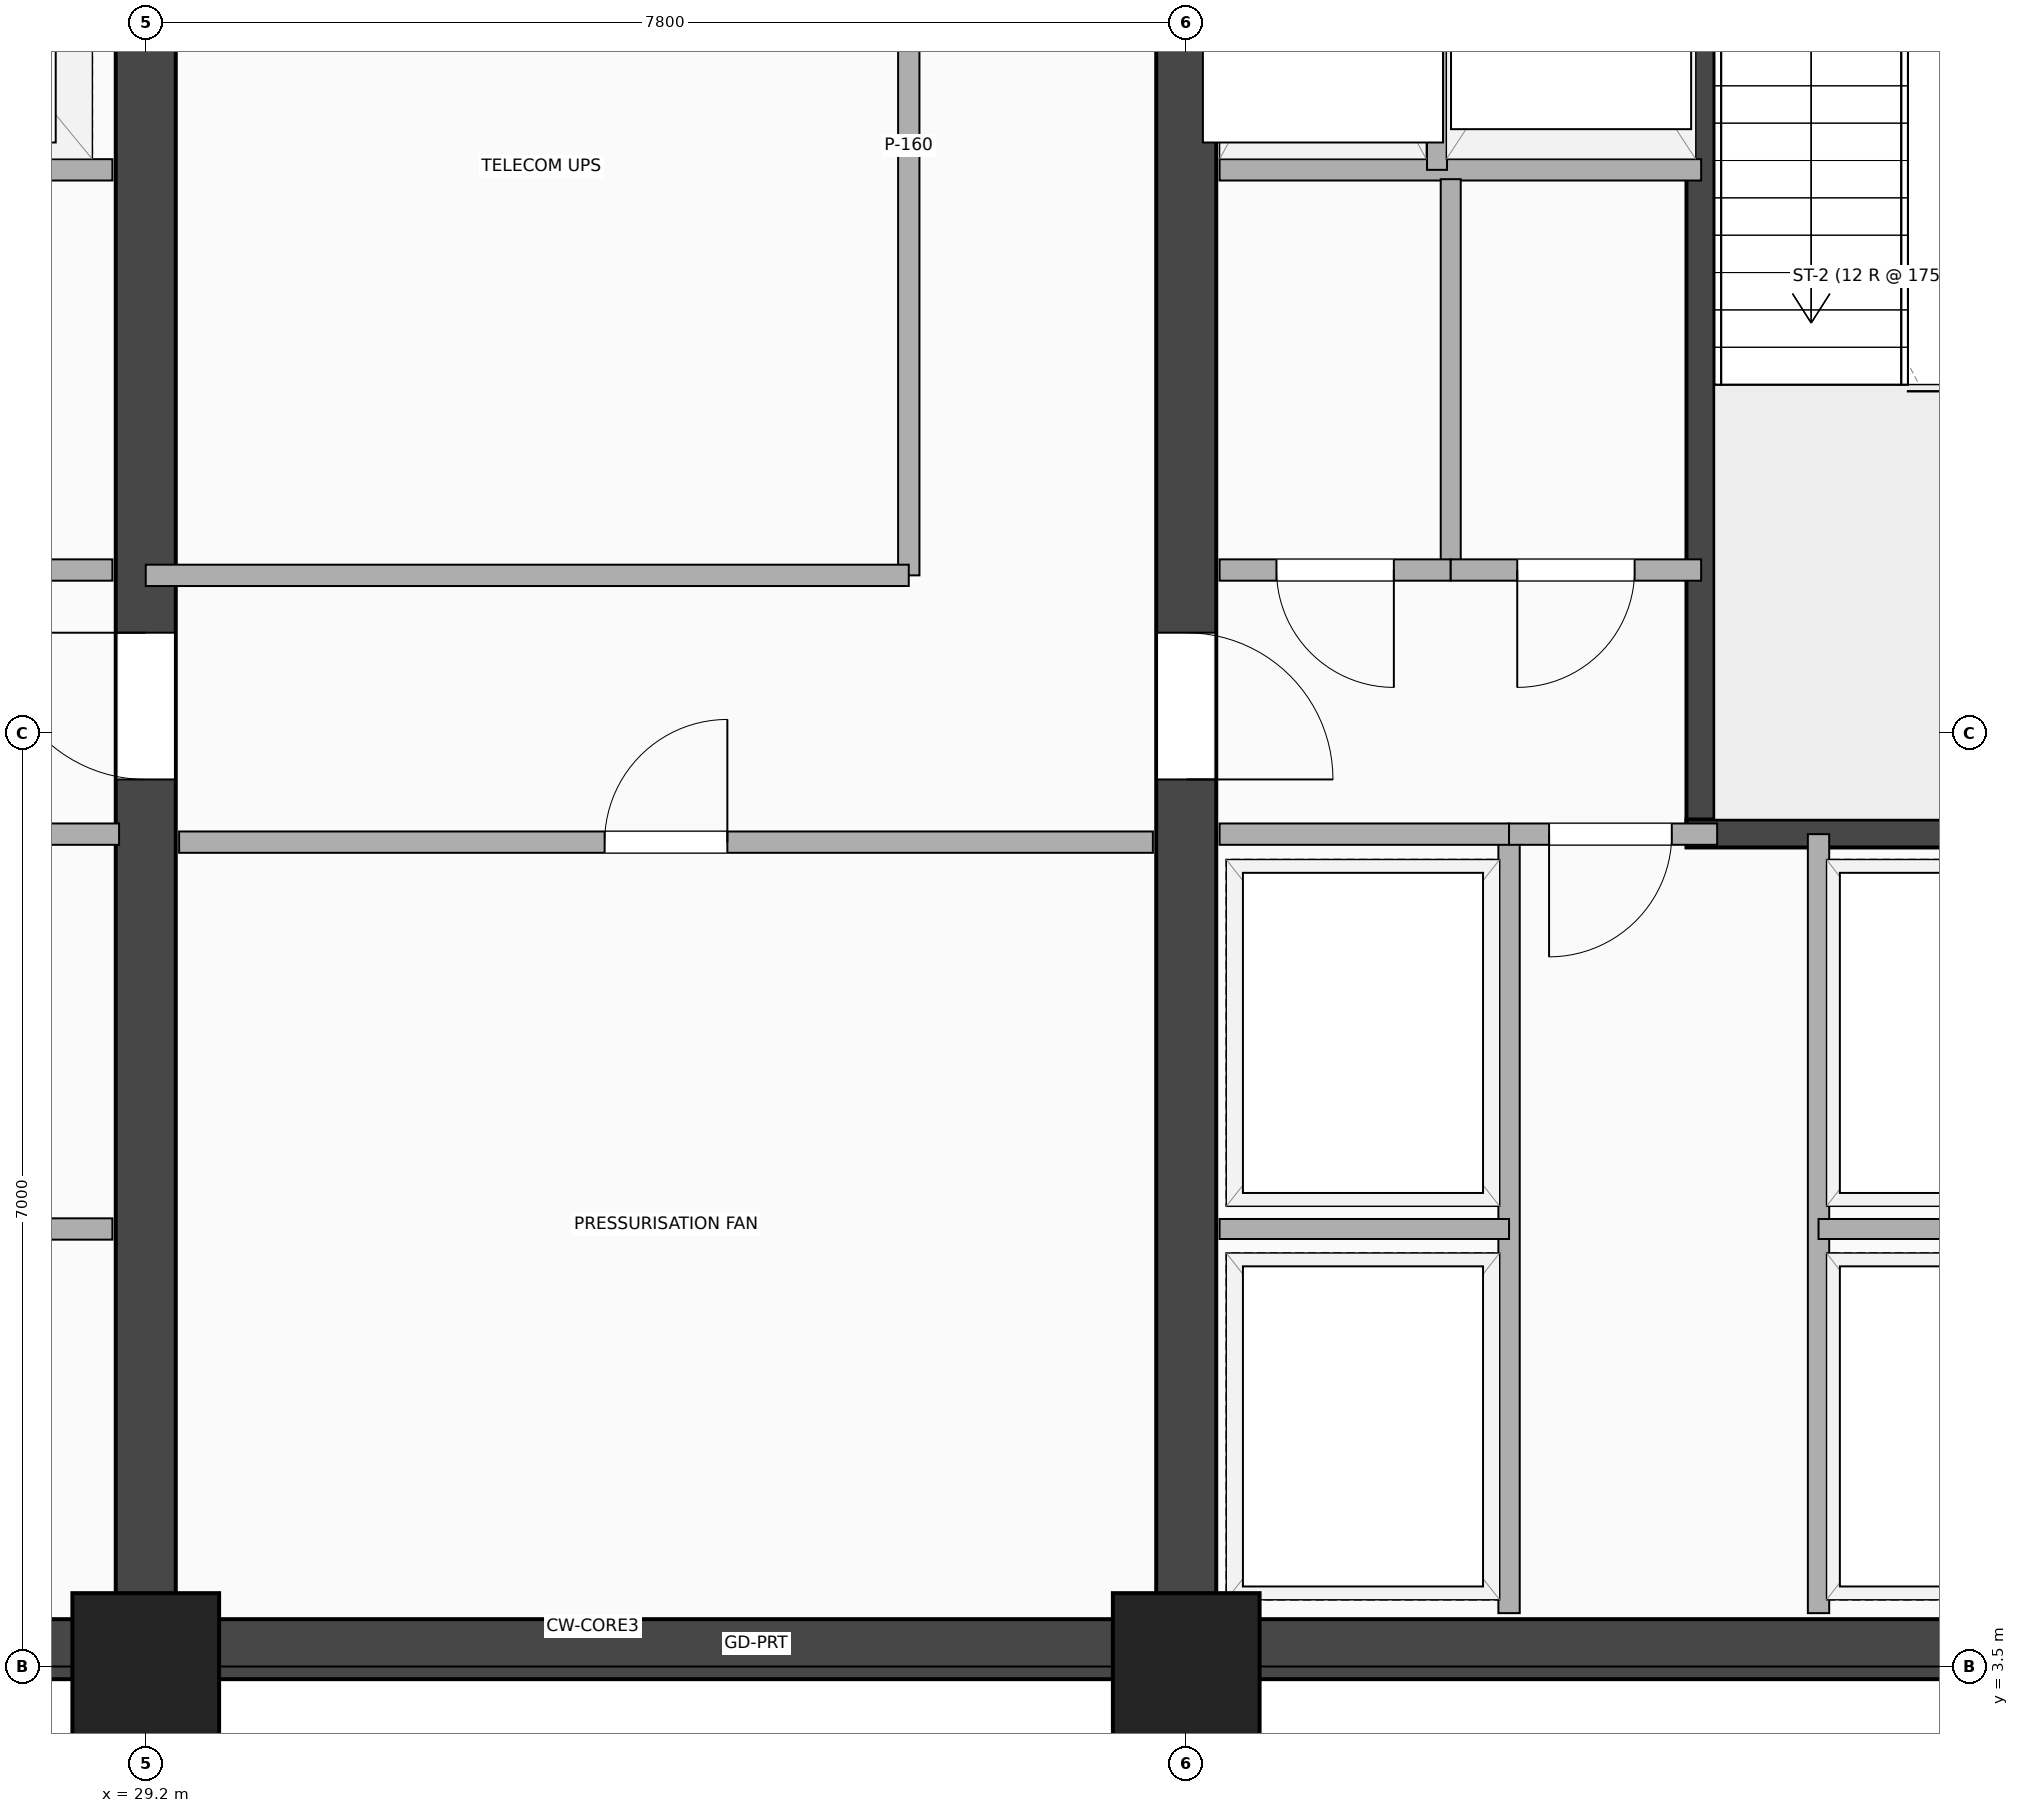
"""IFC4 building model, lengths in metres.
Left out: names, types, materials, properties, quantities, classifications, styles, units other than length and angle.
Written with IfcOpenShell. Run it as: python <this file> out.ifc"""

import sys

from ifc_helpers import new_model, si_unit, direction, frame, frame_2d, origin, origin_2d, place, context, subcontext, project, spatial, rectangle, extrude, element, fill, save


model = new_model("IFC4")
c1 = context("Model", 3, precision=1e-05, world=origin(), true_north=direction((0.0, 1.0)))
c2 = subcontext(c1, "Body", "Model", "MODEL_VIEW")
j1 = project(units=[si_unit("LENGTHUNIT", "METRE"), si_unit("PLANEANGLEUNIT", "RADIAN")], contexts=[c1])
p1 = place(None, origin())
s1 = spatial("IfcSite", under=j1, at=p1, CompositionType="ELEMENT")
p2 = place(p1, origin())
s2 = spatial("IfcBuilding", under=s1, at=p2, CompositionType="ELEMENT")
p3 = place(p2, frame((0.0, 0.0, 184.1)))
s3 = spatial("IfcBuildingStorey", under=s2, at=p3, CompositionType="ELEMENT", Elevation=184.1)
p4 = place(p3, frame((20.3, 3.63, 0.0), z_axis=(0.0, 0.0, 1.0), x_axis=(1.0, 0.0, 0.0)))
e1 = element("IfcWall", 1, at=p4, inside=s3, PredefinedType="SHEAR", context=c2, shape_type="SweptSolid", body=[
    extrude(rectangle(XDim=24.5, YDim=0.45, at=frame_2d((12.25, 0.0))), origin(), (0.0, 0.0, 1.0), 8.16),
])
p5 = place(p3, frame((29.2, 3.5, 0.0), z_axis=(0.0, 0.0, 1.0), x_axis=(0.0, 1.0, 0.0)))
e2 = element("IfcWall", 2, at=p5, inside=s3, PredefinedType="SHEAR", context=c2, shape_type="SweptSolid", body=[
    extrude(rectangle(XDim=14.95, YDim=0.45, at=frame_2d((7.475, 0.0))), origin(), (0.0, 0.0, 1.0), 8.16),
])
p6 = place(p5, frame((7.75, 0.0, 0.0), z_axis=(0.0, 0.0, 1.0), x_axis=(-1.0, 0.0, 0.0)))
e3 = element("IfcOpeningElement", 3, at=p6, cuts=e2, PredefinedType="OPENING", context=c2, shape_type="SweptSolid", body=[
    extrude(rectangle(XDim=1.1, YDim=2.15, at=frame_2d((0.55, 1.075))), frame((0.0, 0.235, 0.0), z_axis=(0.0, -1.0, 0.0), x_axis=(1.0, 0.0, 0.0)), (0.0, 0.0, 1.0), 0.47),
])
p7 = place(p3, frame((37.0, 3.5, 0.0), z_axis=(0.0, 0.0, 1.0), x_axis=(0.0, 1.0, 0.0)))
e4 = element("IfcWall", 4, at=p7, inside=s3, PredefinedType="SHEAR", context=c2, shape_type="SweptSolid", body=[
    extrude(rectangle(XDim=14.95, YDim=0.45, at=frame_2d((7.475, 0.0))), origin(), (0.0, 0.0, 1.0), 8.16),
])
p8 = place(p7, frame((6.65, 0.0, 0.0)))
e5 = element("IfcOpeningElement", 5, at=p8, cuts=e4, PredefinedType="OPENING", context=c2, shape_type="SweptSolid", body=[
    extrude(rectangle(XDim=1.1, YDim=2.15, at=frame_2d((0.55, 1.075))), frame((0.0, 0.235, 0.0), z_axis=(0.0, -1.0, 0.0), x_axis=(1.0, 0.0, 0.0)), (0.0, 0.0, 1.0), 0.47),
])
p9 = place(p3, frame((40.855, 9.745, 0.0), z_axis=(0.0, 0.0, 1.0), x_axis=(0.0, 1.0, 0.0)))
e6 = element("IfcWall", 6, at=p9, inside=s3, PredefinedType="SHEAR", context=c2, shape_type="SweptSolid", body=[
    extrude(rectangle(XDim=8.01, YDim=0.21, at=frame_2d((4.005, 0.0))), origin(), (0.0, 0.0, 1.0), 8.16),
])
p10 = place(p3, frame((40.75, 9.745, 0.0), z_axis=(0.0, 0.0, 1.0), x_axis=(1.0, 0.0, 0.0)))
e7 = element("IfcWall", 7, at=p10, inside=s3, PredefinedType="SHEAR", context=c2, shape_type="SweptSolid", body=[
    extrude(rectangle(XDim=3.66, YDim=0.21, at=frame_2d((1.83, 0.0))), origin(), (0.0, 0.0, 1.0), 8.16),
])
for number, where, z_axis, x_axis in (
    (8, (29.2, 3.5, -0.32), (0.0, 0.0, 1.0), (1.0, 0.0, 0.0)),
    (9, (37.0, 3.5, -0.32), (0.0, 0.0, 1.0), (1.0, 0.0, 0.0)),
):
    element("IfcColumn", number, at=place(p3, frame(where, z_axis=z_axis, x_axis=x_axis)), inside=s3, PredefinedType="COLUMN", context=c2, shape_type="SweptSolid", body=[
        extrude(rectangle(XDim=1.1, YDim=1.1, at=origin_2d()), origin(), (0.0, 0.0, 1.0), 8.48),
    ])
p11 = place(p3, frame((24.22, 14.72, 0.0), z_axis=(0.0, 0.0, 1.0), x_axis=(1.0, 0.0, 0.0)))
e10 = element("IfcWall", 10, at=p11, inside=s3, PredefinedType="PARTITIONING", context=c2, shape_type="SweptSolid", body=[
    extrude(rectangle(XDim=4.73, YDim=0.16, at=frame_2d((2.365, 0.0))), origin(), (0.0, 0.0, 1.0), 8.16),
])
p12 = place(p3, frame((37.25, 14.72, 0.0), z_axis=(0.0, 0.0, 1.0), x_axis=(1.0, 0.0, 0.0)))
e11 = element("IfcWall", 11, at=p12, inside=s3, PredefinedType="PARTITIONING", context=c2, shape_type="SweptSolid", body=[
    extrude(rectangle(XDim=3.61, YDim=0.16, at=frame_2d((1.805, 0.0))), origin(), (0.0, 0.0, 1.0), 8.16),
])
p13 = place(p3, frame((38.88, 14.72, 0.0), z_axis=(0.0, 0.0, 1.0), x_axis=(0.0, 1.0, 0.0)))
e12 = element("IfcWall", 12, at=p13, inside=s3, PredefinedType="PARTITIONING", context=c2, shape_type="SweptSolid", body=[
    extrude(rectangle(XDim=3.04, YDim=0.15, at=frame_2d((1.52, 0.0))), origin(), (0.0, 0.0, 1.0), 8.16),
])
p14 = place(p3, frame((24.22, 11.72, 0.0), z_axis=(0.0, 0.0, 1.0), x_axis=(1.0, 0.0, 0.0)))
e13 = element("IfcWall", 13, at=p14, inside=s3, PredefinedType="PARTITIONING", context=c2, shape_type="SweptSolid", body=[
    extrude(rectangle(XDim=4.73, YDim=0.16, at=frame_2d((2.365, 0.0))), origin(), (0.0, 0.0, 1.0), 8.16),
])
p15 = place(p14, frame((1.905, 0.0, 0.0)))
e14 = element("IfcOpeningElement", 14, at=p15, cuts=e13, PredefinedType="OPENING", context=c2, shape_type="SweptSolid", body=[
    extrude(rectangle(XDim=0.92, YDim=2.08, at=frame_2d((0.46, 1.04))), frame((0.0, 0.09, 0.0), z_axis=(0.0, -1.0, 0.0), x_axis=(1.0, 0.0, 0.0)), (0.0, 0.0, 1.0), 0.18),
])
p16 = place(p3, frame((38.983, 11.72, 0.0), z_axis=(0.0, 0.0, 1.0), x_axis=(0.0, 1.0, 0.0)))
e15 = element("IfcWall", 15, at=p16, inside=s3, PredefinedType="PARTITIONING", context=c2, shape_type="SweptSolid", body=[
    extrude(rectangle(XDim=2.93, YDim=0.15, at=frame_2d((1.465, 0.0))), origin(), (0.0, 0.0, 1.0), 8.16),
])
p17 = place(p3, frame((37.25, 11.72, 0.0), z_axis=(0.0, 0.0, 1.0), x_axis=(1.0, 0.0, 0.0)))
e16 = element("IfcWall", 16, at=p17, inside=s3, PredefinedType="PARTITIONING", context=c2, shape_type="SweptSolid", body=[
    extrude(rectangle(XDim=1.733, YDim=0.16, at=frame_2d((0.866, 0.0))), origin(), (0.0, 0.0, 1.0), 8.16),
])
p18 = place(p17, frame((0.427, 0.0, 0.0)))
e17 = element("IfcOpeningElement", 17, at=p18, cuts=e16, PredefinedType="OPENING", context=c2, shape_type="SweptSolid", body=[
    extrude(rectangle(XDim=0.88, YDim=2.08, at=frame_2d((0.44, 1.04))), frame((0.0, 0.09, 0.0), z_axis=(0.0, -1.0, 0.0), x_axis=(1.0, 0.0, 0.0)), (0.0, 0.0, 1.0), 0.18),
])
p19 = place(p3, frame((38.983, 11.72, 0.0), z_axis=(0.0, 0.0, 1.0), x_axis=(1.0, 0.0, 0.0)))
e18 = element("IfcWall", 18, at=p19, inside=s3, PredefinedType="PARTITIONING", context=c2, shape_type="SweptSolid", body=[
    extrude(rectangle(XDim=1.877, YDim=0.16, at=frame_2d((0.938, 0.0))), origin(), (0.0, 0.0, 1.0), 8.16),
])
p20 = place(p19, frame((0.499, 0.0, 0.0)))
e19 = element("IfcOpeningElement", 19, at=p20, cuts=e18, PredefinedType="OPENING", context=c2, shape_type="SweptSolid", body=[
    extrude(rectangle(XDim=0.88, YDim=2.08, at=frame_2d((0.44, 1.04))), frame((0.0, 0.09, 0.0), z_axis=(0.0, -1.0, 0.0), x_axis=(1.0, 0.0, 0.0)), (0.0, 0.0, 1.0), 0.18),
])
p21 = place(p3, frame((20.65, 6.78, 0.0), z_axis=(0.0, 0.0, 1.0), x_axis=(1.0, 0.0, 0.0)))
e20 = element("IfcWall", 20, at=p21, inside=s3, PredefinedType="PARTITIONING", context=c2, shape_type="SweptSolid", body=[
    extrude(rectangle(XDim=8.3, YDim=0.16, at=frame_2d((4.15, 0.0))), origin(), (0.0, 0.0, 1.0), 7.29),
])
p22 = place(p3, frame((24.2, 9.74, 0.0), z_axis=(0.0, 0.0, 1.0), x_axis=(1.0, 0.0, 0.0)))
e21 = element("IfcWall", 21, at=p22, inside=s3, PredefinedType="PARTITIONING", context=c2, shape_type="SweptSolid", body=[
    extrude(rectangle(XDim=4.8, YDim=0.16, at=frame_2d((2.4, 0.0))), origin(), (0.0, 0.0, 1.0), 8.16),
])
p23 = place(p22, frame((1.85, 0.0, 0.0)))
e22 = element("IfcOpeningElement", 22, at=p23, cuts=e21, PredefinedType="OPENING", context=c2, shape_type="SweptSolid", body=[
    extrude(rectangle(XDim=1.1, YDim=2.15, at=frame_2d((0.55, 1.075))), frame((0.0, 0.09, 0.0), z_axis=(0.0, -1.0, 0.0), x_axis=(1.0, 0.0, 0.0)), (0.0, 0.0, 1.0), 0.18),
])
for number, where, z_axis, x_axis in (
    (23, (39.42, 3.9, 0.0), (0.0, 0.0, 1.0), (0.0, 1.0, 0.0)),
    (24, (41.74, 3.9, 0.0), (0.0, 0.0, 1.0), (0.0, 1.0, 0.0)),
):
    element("IfcWall", number, at=place(p3, frame(where, z_axis=z_axis, x_axis=x_axis)), inside=s3, PredefinedType="PARTITIONING", context=c2, shape_type="SweptSolid", body=[
        extrude(rectangle(XDim=5.84, YDim=0.16, at=frame_2d((2.92, 0.0))), origin(), (0.0, 0.0, 1.0), 8.16),
    ])
p24 = place(p3, frame((37.25, 6.78, 0.0), z_axis=(0.0, 0.0, 1.0), x_axis=(1.0, 0.0, 0.0)))
e25 = element("IfcWall", 25, at=p24, inside=s3, PredefinedType="PARTITIONING", context=c2, shape_type="SweptSolid", body=[
    extrude(rectangle(XDim=2.17, YDim=0.15, at=frame_2d((1.085, 0.0))), origin(), (0.0, 0.0, 1.0), 8.16),
])
p25 = place(p3, frame((41.74, 6.78, 0.0), z_axis=(0.0, 0.0, 1.0), x_axis=(1.0, 0.0, 0.0)))
e26 = element("IfcWall", 26, at=p25, inside=s3, PredefinedType="PARTITIONING", context=c2, shape_type="SweptSolid", body=[
    extrude(rectangle(XDim=2.66, YDim=0.15, at=frame_2d((1.33, 0.0))), origin(), (0.0, 0.0, 1.0), 6.465),
])
p26 = place(p3, frame((37.25, 9.74, 0.0), z_axis=(0.0, 0.0, 1.0), x_axis=(1.0, 0.0, 0.0)))
e27 = element("IfcWall", 27, at=p26, inside=s3, PredefinedType="PARTITIONING", context=c2, shape_type="SweptSolid", body=[
    extrude(rectangle(XDim=2.17, YDim=0.16, at=frame_2d((1.085, 0.0))), origin(), (0.0, 0.0, 1.0), 8.16),
])
p27 = place(p3, frame((39.42, 9.74, 0.0), z_axis=(0.0, 0.0, 1.0), x_axis=(1.0, 0.0, 0.0)))
e28 = element("IfcWall", 28, at=p27, inside=s3, PredefinedType="PARTITIONING", context=c2, shape_type="SweptSolid", body=[
    extrude(rectangle(XDim=1.56, YDim=0.16, at=frame_2d((0.78, 0.0))), origin(), (0.0, 0.0, 1.0), 8.16),
])
p28 = place(p27, frame((0.3, 0.0, 0.0)))
e29 = element("IfcOpeningElement", 29, at=p28, cuts=e28, PredefinedType="OPENING", context=c2, shape_type="SweptSolid", body=[
    extrude(rectangle(XDim=0.92, YDim=2.08, at=frame_2d((0.46, 1.04))), frame((0.0, 0.09, 0.0), z_axis=(0.0, -1.0, 0.0), x_axis=(1.0, 0.0, 0.0)), (0.0, 0.0, 1.0), 0.18),
])
p29 = place(p3, frame((34.92, 11.68, 0.0), z_axis=(0.0, 0.0, 1.0), x_axis=(0.0, 1.0, 0.0)))
e30 = element("IfcWall", 30, at=p29, inside=s3, PredefinedType="PARTITIONING", context=c2, shape_type="SweptSolid", body=[
    extrude(rectangle(XDim=6.1, YDim=0.16, at=frame_2d((3.05, 0.0))), origin(), (0.0, 0.0, 1.0), 8.16),
])
p30 = place(p3, frame((29.45, 9.68, 0.0), z_axis=(0.0, 0.0, 1.0), x_axis=(1.0, 0.0, 0.0)))
e31 = element("IfcWall", 31, at=p30, inside=s3, PredefinedType="PARTITIONING", context=c2, shape_type="SweptSolid", body=[
    extrude(rectangle(XDim=7.3, YDim=0.16, at=frame_2d((3.65, 0.0))), origin(), (0.0, 0.0, 1.0), 8.16),
])
p31 = place(p30, frame((4.11, 0.0, 0.0), z_axis=(0.0, 0.0, 1.0), x_axis=(-1.0, 0.0, 0.0)))
e32 = element("IfcOpeningElement", 32, at=p31, cuts=e31, PredefinedType="OPENING", context=c2, shape_type="SweptSolid", body=[
    extrude(rectangle(XDim=0.92, YDim=2.08, at=frame_2d((0.46, 1.04))), frame((0.0, 0.09, 0.0), z_axis=(0.0, -1.0, 0.0), x_axis=(1.0, 0.0, 0.0)), (0.0, 0.0, 1.0), 0.18),
])
p32 = place(p3, frame((29.2, 11.68, 0.0), z_axis=(0.0, 0.0, 1.0), x_axis=(1.0, 0.0, 0.0)))
e33 = element("IfcWall", 33, at=p32, inside=s3, PredefinedType="PARTITIONING", context=c2, shape_type="SweptSolid", body=[
    extrude(rectangle(XDim=5.72, YDim=0.16, at=frame_2d((2.86, 0.0))), origin(), (0.0, 0.0, 1.0), 8.16),
])
p33 = place(p6, origin())
e34 = element("IfcDoor", 34, at=p33, inside=s3, OperationType="SINGLE_SWING_RIGHT", PredefinedType="DOOR", context=c2, shape_type="SweptSolid", body=[
    extrude(rectangle(XDim=1.1, YDim=2.15, at=frame_2d((0.55, 1.075))), frame((0.0, 0.025, 0.0), z_axis=(0.0, -1.0, 0.0), x_axis=(1.0, 0.0, 0.0)), (0.0, 0.0, 1.0), 0.05),
])
fill(e3, e34)
p34 = place(p8, origin())
e35 = element("IfcDoor", 35, at=p34, inside=s3, OperationType="SINGLE_SWING_LEFT", PredefinedType="DOOR", context=c2, shape_type="SweptSolid", body=[
    extrude(rectangle(XDim=1.1, YDim=2.15, at=frame_2d((0.55, 1.075))), frame((0.0, 0.025, 0.0), z_axis=(0.0, -1.0, 0.0), x_axis=(1.0, 0.0, 0.0)), (0.0, 0.0, 1.0), 0.05),
])
fill(e5, e35)
p35 = place(p18, origin())
e36 = element("IfcDoor", 36, at=p35, inside=s3, OperationType="SINGLE_SWING_RIGHT", PredefinedType="DOOR", context=c2, shape_type="SweptSolid", body=[
    extrude(rectangle(XDim=0.88, YDim=2.08, at=frame_2d((0.44, 1.04))), frame((0.0, 0.025, 0.0), z_axis=(0.0, -1.0, 0.0), x_axis=(1.0, 0.0, 0.0)), (0.0, 0.0, 1.0), 0.05),
])
fill(e17, e36)
p36 = place(p20, origin())
e37 = element("IfcDoor", 37, at=p36, inside=s3, OperationType="SINGLE_SWING_LEFT", PredefinedType="DOOR", context=c2, shape_type="SweptSolid", body=[
    extrude(rectangle(XDim=0.88, YDim=2.08, at=frame_2d((0.44, 1.04))), frame((0.0, 0.025, 0.0), z_axis=(0.0, -1.0, 0.0), x_axis=(1.0, 0.0, 0.0)), (0.0, 0.0, 1.0), 0.05),
])
fill(e19, e37)
p37 = place(p28, origin())
e38 = element("IfcDoor", 38, at=p37, inside=s3, OperationType="SINGLE_SWING_LEFT", PredefinedType="DOOR", context=c2, shape_type="SweptSolid", body=[
    extrude(rectangle(XDim=0.92, YDim=2.08, at=frame_2d((0.46, 1.04))), frame((0.0, 0.025, 0.0), z_axis=(0.0, -1.0, 0.0), x_axis=(1.0, 0.0, 0.0)), (0.0, 0.0, 1.0), 0.05),
])
fill(e29, e38)
p38 = place(p31, origin())
e39 = element("IfcDoor", 39, at=p38, inside=s3, OperationType="SINGLE_SWING_RIGHT", PredefinedType="DOOR", context=c2, shape_type="SweptSolid", body=[
    extrude(rectangle(XDim=0.92, YDim=2.08, at=frame_2d((0.46, 1.04))), frame((0.0, 0.025, 0.0), z_axis=(0.0, -1.0, 0.0), x_axis=(1.0, 0.0, 0.0)), (0.0, 0.0, 1.0), 0.05),
])
fill(e32, e39)
save(model, sys.argv[1])
